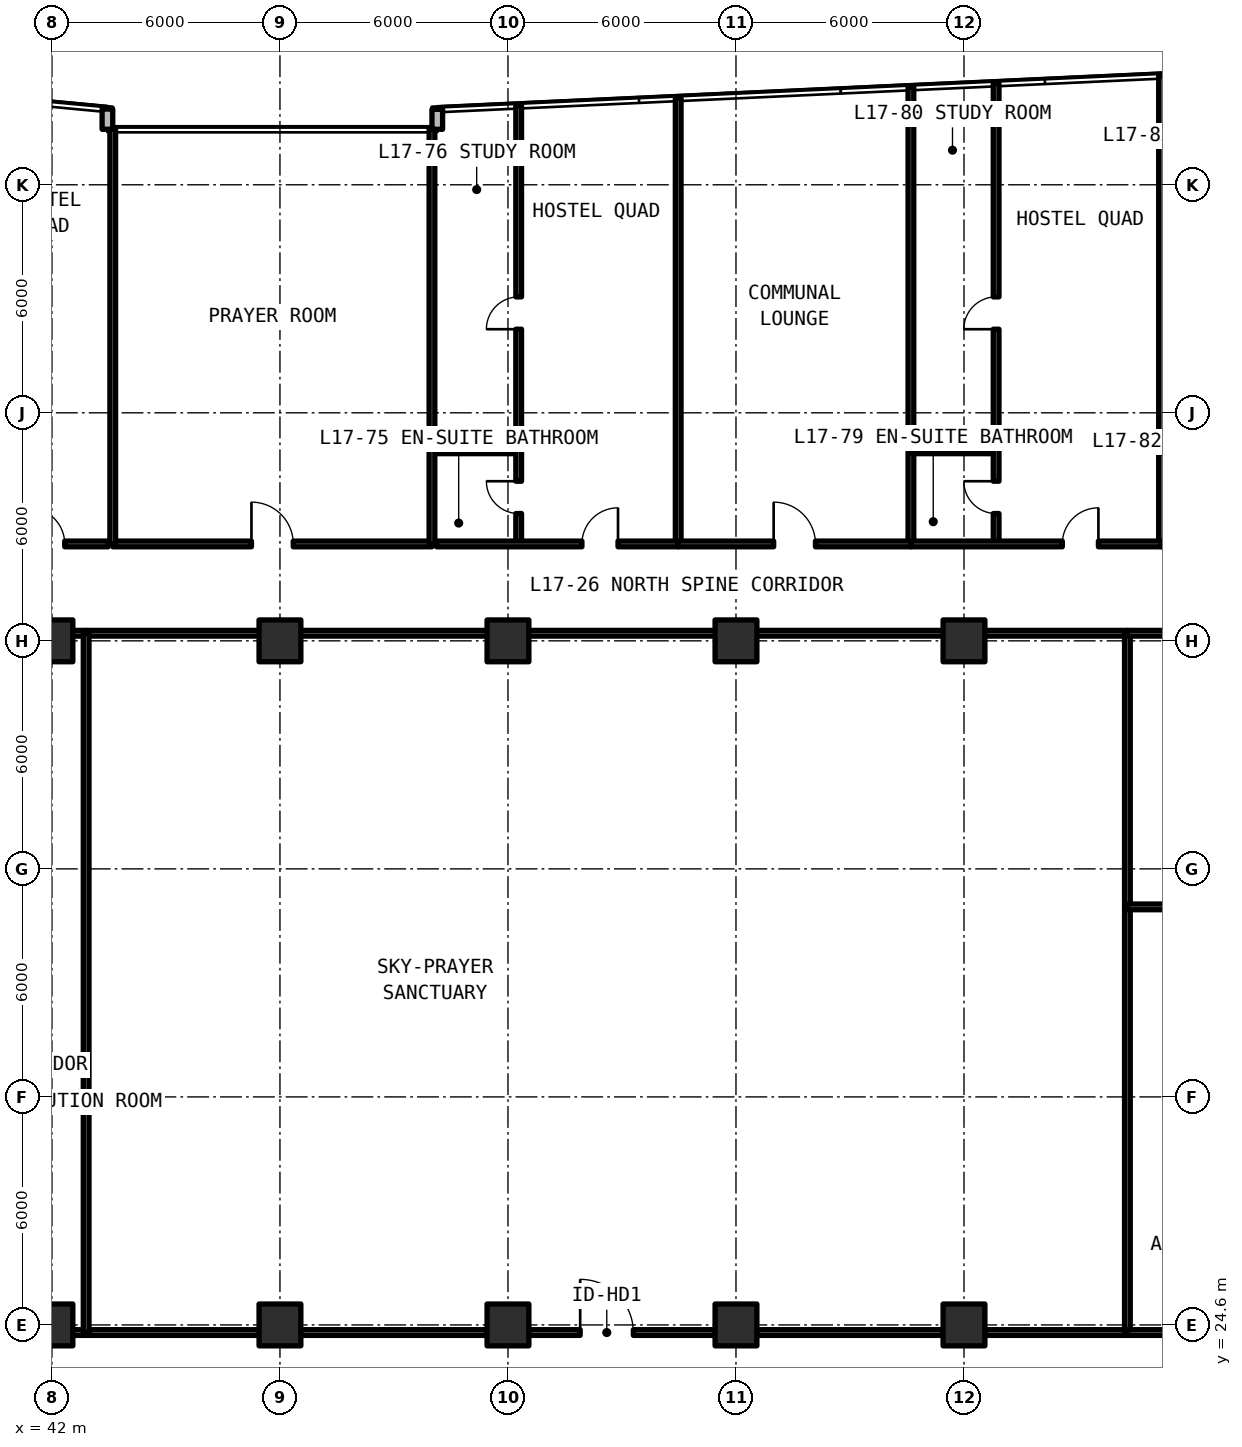
"""IFC4 building model, lengths in metres.
Left out: names, types, materials, properties, quantities, classifications, styles, units other than length and angle.
Written with IfcOpenShell. Run it as: python <this file> out.ifc"""

import sys

from ifc_helpers import new_model, si_unit, direction, frame, frame_2d, origin, origin_2d, place, context, subcontext, project, spatial, rectangle, extrude, element, fill, save


model = new_model("IFC4")
c1 = context("Model", 3, precision=1e-05, world=origin(), true_north=direction((0.0, 1.0)))
c2 = subcontext(c1, "Body", "Model", "MODEL_VIEW")
j1 = project(units=[si_unit("LENGTHUNIT", "METRE"), si_unit("PLANEANGLEUNIT", "RADIAN")], contexts=[c1])
p1 = place(None, origin())
s1 = spatial("IfcSite", under=j1, at=p1, CompositionType="ELEMENT")
p2 = place(p1, origin())
s2 = spatial("IfcBuilding", under=s1, at=p2, CompositionType="ELEMENT")
p3 = place(p2, frame((0.0, 0.0, 62.37)))
s3 = spatial("IfcBuildingStorey", under=s2, at=p3, CompositionType="ELEMENT", Elevation=62.37)
for number, where, z_axis, x_axis in (
    (1, (42.0, 24.6, 0.0), (0.0, 0.0, 1.0), (1.0, 0.0, 0.0)),
    (2, (42.0, 42.6, 0.0), (0.0, 0.0, 1.0), (1.0, 0.0, 0.0)),
    (3, (48.0, 24.6, 0.0), (0.0, 0.0, 1.0), (1.0, 0.0, 0.0)),
    (4, (48.0, 42.6, 0.0), (0.0, 0.0, 1.0), (1.0, 0.0, 0.0)),
    (5, (54.0, 24.6, 0.0), (0.0, 0.0, 1.0), (1.0, 0.0, 0.0)),
    (6, (54.0, 42.6, 0.0), (0.0, 0.0, 1.0), (1.0, 0.0, 0.0)),
    (7, (60.0, 24.6, 0.0), (0.0, 0.0, 1.0), (1.0, 0.0, 0.0)),
    (8, (60.0, 42.6, 0.0), (0.0, 0.0, 1.0), (1.0, 0.0, 0.0)),
    (9, (66.0, 24.6, 0.0), (0.0, 0.0, 1.0), (1.0, 0.0, 0.0)),
    (10, (66.0, 42.6, 0.0), (0.0, 0.0, 1.0), (1.0, 0.0, 0.0)),
):
    element("IfcColumn", number, at=place(p3, frame(where, z_axis=z_axis, x_axis=x_axis)), inside=s3, PredefinedType="COLUMN", context=c2, shape_type="SweptSolid", body=[
        extrude(rectangle(XDim=1.1, YDim=1.1, at=origin_2d()), origin(), (0.0, 0.0, 1.0), 3.63),
    ])
p4 = place(p3, frame((52.14, 56.586, 0.0), z_axis=(0.0, 0.0, 1.0), x_axis=(0.0, -1.0, 0.0)))
e11 = element("IfcWall", 11, at=p4, inside=s3, PredefinedType="SOLIDWALL", context=c2, shape_type="SweptSolid", body=[
    extrude(rectangle(XDim=0.526, YDim=0.28, at=frame_2d((0.263, 0.0))), origin(), (0.0, 0.0, 1.0), 3.41),
])
p5 = place(p3, frame((43.46, 56.06, 0.0), z_axis=(0.0, 0.0, 1.0), x_axis=(0.0, 1.0, 0.0)))
e12 = element("IfcWall", 12, at=p5, inside=s3, PredefinedType="SOLIDWALL", context=c2, shape_type="SweptSolid", body=[
    extrude(rectangle(XDim=0.532, YDim=0.28, at=frame_2d((0.266, 0.0))), origin(), (0.0, 0.0, 1.0), 3.41),
])
p6 = place(p3, frame((38.6, 24.4, 0.0), z_axis=(0.0, 0.0, 1.0), x_axis=(1.0, 0.0, 0.0)))
e13 = element("IfcWall", 13, at=p6, inside=s3, PredefinedType="SOLIDWALL", context=c2, shape_type="SweptSolid", body=[
    extrude(rectangle(XDim=4.3, YDim=0.15, at=frame_2d((2.15, 0.0))), origin(), (0.0, 0.0, 1.0), 2.625),
])
p7 = place(p3, frame((38.6, 31.4, 0.0), z_axis=(0.0, 0.0, 1.0), x_axis=(1.0, 0.0, 0.0)))
e14 = element("IfcWall", 14, at=p7, inside=s3, PredefinedType="SOLIDWALL", context=c2, shape_type="SweptSolid", body=[
    extrude(rectangle(XDim=4.3, YDim=0.15, at=frame_2d((2.15, 0.0))), origin(), (0.0, 0.0, 1.0), 2.63),
])
p8 = place(p3, frame((38.6, 42.8, 0.0), z_axis=(0.0, 0.0, 1.0), x_axis=(1.0, 0.0, 0.0)))
e15 = element("IfcWall", 15, at=p8, inside=s3, PredefinedType="SOLIDWALL", context=c2, shape_type="SweptSolid", body=[
    extrude(rectangle(XDim=4.3, YDim=0.15, at=frame_2d((2.15, 0.0))), origin(), (0.0, 0.0, 1.0), 2.625),
])
p9 = place(p3, frame((42.9, 24.4, 0.0), z_axis=(0.0, 0.0, 1.0), x_axis=(1.0, 0.0, 0.0)))
e16 = element("IfcWall", 16, at=p9, inside=s3, PredefinedType="SOLIDWALL", context=c2, shape_type="SweptSolid", body=[
    extrude(rectangle(XDim=27.4, YDim=0.15, at=frame_2d((13.7, 0.0))), origin(), (0.0, 0.0, 1.0), 2.625),
])
p10 = place(p9, frame((13.0, 0.0, 0.0)))
e17 = element("IfcOpeningElement", 17, at=p10, cuts=e16, PredefinedType="OPENING", context=c2, shape_type="SweptSolid", body=[
    extrude(rectangle(XDim=1.4, YDim=2.15, at=frame_2d((0.7, 1.075))), frame((0.0, 0.085, 0.0), z_axis=(0.0, -1.0, 0.0), x_axis=(1.0, 0.0, 0.0)), (0.0, 0.0, 1.0), 0.17),
])
p11 = place(p3, frame((42.9, 42.8, 0.0), z_axis=(0.0, 0.0, 1.0), x_axis=(1.0, 0.0, 0.0)))
e18 = element("IfcWall", 18, at=p11, inside=s3, PredefinedType="SOLIDWALL", context=c2, shape_type="SweptSolid", body=[
    extrude(rectangle(XDim=27.4, YDim=0.15, at=frame_2d((13.7, 0.0))), origin(), (0.0, 0.0, 1.0), 2.625),
])
for number, where, z_axis, x_axis in (
    (19, (42.9, 24.4, 0.0), (0.0, 0.0, 1.0), (0.0, 1.0, 0.0)),
    (20, (70.3, 24.4, 0.0), (0.0, 0.0, 1.0), (0.0, 1.0, 0.0)),
):
    element("IfcWall", number, at=place(p3, frame(where, z_axis=z_axis, x_axis=x_axis)), inside=s3, PredefinedType="SOLIDWALL", context=c2, shape_type="SweptSolid", body=[
        extrude(rectangle(XDim=18.4, YDim=0.15, at=frame_2d((9.2, 0.0))), origin(), (0.0, 0.0, 1.0), 2.63),
    ])
p12 = place(p3, frame((70.3, 24.4, 0.0), z_axis=(0.0, 0.0, 1.0), x_axis=(1.0, 0.0, 0.0)))
e21 = element("IfcWall", 21, at=p12, inside=s3, PredefinedType="SOLIDWALL", context=c2, shape_type="SweptSolid", body=[
    extrude(rectangle(XDim=5.1, YDim=0.15, at=frame_2d((2.55, 0.0))), origin(), (0.0, 0.0, 1.0), 2.625),
])
p13 = place(p3, frame((70.3, 35.6, 0.0), z_axis=(0.0, 0.0, 1.0), x_axis=(1.0, 0.0, 0.0)))
e22 = element("IfcWall", 22, at=p13, inside=s3, PredefinedType="SOLIDWALL", context=c2, shape_type="SweptSolid", body=[
    extrude(rectangle(XDim=5.1, YDim=0.15, at=frame_2d((2.55, 0.0))), origin(), (0.0, 0.0, 1.0), 2.63),
])
p14 = place(p3, frame((70.3, 42.8, 0.0), z_axis=(0.0, 0.0, 1.0), x_axis=(1.0, 0.0, 0.0)))
e23 = element("IfcWall", 23, at=p14, inside=s3, PredefinedType="SOLIDWALL", context=c2, shape_type="SweptSolid", body=[
    extrude(rectangle(XDim=5.1, YDim=0.15, at=frame_2d((2.55, 0.0))), origin(), (0.0, 0.0, 1.0), 2.625),
])
p15 = place(p3, frame((43.6, 45.15, 0.0), z_axis=(0.0, 0.0, 1.0), x_axis=(1.0, 0.0, 0.0)))
e24 = element("IfcWall", 24, at=p15, inside=s3, PredefinedType="SOLIDWALL", context=c2, shape_type="SweptSolid", body=[
    extrude(rectangle(XDim=8.4, YDim=0.15, at=frame_2d((4.2, 0.0))), origin(), (0.0, 0.0, 1.0), 2.63),
])
p16 = place(p15, frame((3.65, 0.0, 0.0)))
e25 = element("IfcOpeningElement", 25, at=p16, cuts=e24, PredefinedType="OPENING", context=c2, shape_type="SweptSolid", body=[
    extrude(rectangle(XDim=1.1, YDim=2.15, at=frame_2d((0.55, 1.075))), frame((0.0, 0.085, 0.0), z_axis=(0.0, -1.0, 0.0), x_axis=(1.0, 0.0, 0.0)), (0.0, 0.0, 1.0), 0.17),
])
for number, where, z_axis, x_axis in (
    (26, (43.6, 45.15, 0.0), (0.0, 0.0, 1.0), (0.0, 1.0, 0.0)),
    (27, (52.0, 45.15, 0.0), (0.0, 0.0, 1.0), (0.0, 1.0, 0.0)),
):
    element("IfcWall", number, at=place(p3, frame(where, z_axis=z_axis, x_axis=x_axis)), inside=s3, PredefinedType="SOLIDWALL", context=c2, shape_type="SweptSolid", body=[
        extrude(rectangle(XDim=10.91, YDim=0.15, at=frame_2d((5.455, 0.0))), origin(), (0.0, 0.0, 1.0), 2.63),
    ])
p17 = place(p3, frame((38.312, 45.15, 0.0), z_axis=(0.0, 0.0, 1.0), x_axis=(1.0, 0.0, 0.0)))
e28 = element("IfcWall", 28, at=p17, inside=s3, PredefinedType="SOLIDWALL", context=c2, shape_type="SweptSolid", body=[
    extrude(rectangle(XDim=5.168, YDim=0.15, at=frame_2d((2.584, 0.0))), origin(), (0.0, 0.0, 1.0), 2.63),
])
p18 = place(p17, frame((3.074, 0.0, 0.0)))
e29 = element("IfcOpeningElement", 29, at=p18, cuts=e28, PredefinedType="OPENING", context=c2, shape_type="SweptSolid", body=[
    extrude(rectangle(XDim=0.95, YDim=2.15, at=frame_2d((0.475, 1.075))), frame((0.0, 0.085, 0.0), z_axis=(0.0, -1.0, 0.0), x_axis=(1.0, 0.0, 0.0)), (0.0, 0.0, 1.0), 0.17),
])
p19 = place(p3, frame((58.479, 45.15, 0.0), z_axis=(0.0, 0.0, 1.0), x_axis=(0.0, 1.0, 0.0)))
e30 = element("IfcWall", 30, at=p19, inside=s3, PredefinedType="SOLIDWALL", context=c2, shape_type="SweptSolid", body=[
    extrude(rectangle(XDim=11.731, YDim=0.15, at=frame_2d((5.866, 0.0))), origin(), (0.0, 0.0, 1.0), 2.63),
])
p20 = place(p3, frame((52.12, 47.6, 0.0), z_axis=(0.0, 0.0, 1.0), x_axis=(1.0, 0.0, 0.0)))
e31 = element("IfcWall", 31, at=p20, inside=s3, PredefinedType="PARTITIONING", context=c2, shape_type="SweptSolid", body=[
    extrude(rectangle(XDim=2.162, YDim=0.15, at=frame_2d((1.081, 0.0))), origin(), (0.0, 0.0, 1.0), 2.63),
])
p21 = place(p3, frame((54.282, 45.15, 0.0), z_axis=(0.0, 0.0, 1.0), x_axis=(0.0, 1.0, 0.0)))
e32 = element("IfcWall", 32, at=p21, inside=s3, PredefinedType="PARTITIONING", context=c2, shape_type="SweptSolid", body=[
    extrude(rectangle(XDim=11.536, YDim=0.15, at=frame_2d((5.768, 0.0))), origin(), (0.0, 0.0, 1.0), 2.63),
])
p22 = place(p21, frame((0.8, 0.0, 0.0)))
e33 = element("IfcOpeningElement", 33, at=p22, cuts=e32, PredefinedType="OPENING", context=c2, shape_type="SweptSolid", body=[
    extrude(rectangle(XDim=0.85, YDim=2.1, at=frame_2d((0.425, 1.05))), frame((0.0, 0.085, 0.0), z_axis=(0.0, -1.0, 0.0), x_axis=(1.0, 0.0, 0.0)), (0.0, 0.0, 1.0), 0.17),
])
p23 = place(p21, frame((5.65, 0.0, 0.0)))
e34 = element("IfcOpeningElement", 34, at=p23, cuts=e32, PredefinedType="OPENING", context=c2, shape_type="SweptSolid", body=[
    extrude(rectangle(XDim=0.85, YDim=2.1, at=frame_2d((0.425, 1.05))), frame((0.0, 0.085, 0.0), z_axis=(0.0, -1.0, 0.0), x_axis=(1.0, 0.0, 0.0)), (0.0, 0.0, 1.0), 0.17),
])
p24 = place(p3, frame((52.12, 45.15, 0.0), z_axis=(0.0, 0.0, 1.0), x_axis=(1.0, 0.0, 0.0)))
e35 = element("IfcWall", 35, at=p24, inside=s3, PredefinedType="SOLIDWALL", context=c2, shape_type="SweptSolid", body=[
    extrude(rectangle(XDim=6.359, YDim=0.15, at=frame_2d((3.18, 0.0))), origin(), (0.0, 0.0, 1.0), 2.63),
])
p25 = place(p24, frame((3.826, 0.0, 0.0)))
e36 = element("IfcOpeningElement", 36, at=p25, cuts=e35, PredefinedType="OPENING", context=c2, shape_type="SweptSolid", body=[
    extrude(rectangle(XDim=0.95, YDim=2.15, at=frame_2d((0.475, 1.075))), frame((0.0, 0.085, 0.0), z_axis=(0.0, -1.0, 0.0), x_axis=(1.0, 0.0, 0.0)), (0.0, 0.0, 1.0), 0.17),
])
p26 = place(p3, frame((64.603, 45.15, 0.0), z_axis=(0.0, 0.0, 1.0), x_axis=(0.0, 1.0, 0.0)))
e37 = element("IfcWall", 37, at=p26, inside=s3, PredefinedType="SOLIDWALL", context=c2, shape_type="SweptSolid", body=[
    extrude(rectangle(XDim=12.016, YDim=0.15, at=frame_2d((6.008, 0.0))), origin(), (0.0, 0.0, 1.0), 2.63),
])
p27 = place(p3, frame((58.479, 45.15, 0.0), z_axis=(0.0, 0.0, 1.0), x_axis=(1.0, 0.0, 0.0)))
e38 = element("IfcWall", 38, at=p27, inside=s3, PredefinedType="SOLIDWALL", context=c2, shape_type="SweptSolid", body=[
    extrude(rectangle(XDim=6.124, YDim=0.15, at=frame_2d((3.062, 0.0))), origin(), (0.0, 0.0, 1.0), 2.63),
])
p28 = place(p27, frame((2.512, 0.0, 0.0)))
e39 = element("IfcOpeningElement", 39, at=p28, cuts=e38, PredefinedType="OPENING", context=c2, shape_type="SweptSolid", body=[
    extrude(rectangle(XDim=1.1, YDim=2.15, at=frame_2d((0.55, 1.075))), frame((0.0, 0.085, 0.0), z_axis=(0.0, -1.0, 0.0), x_axis=(1.0, 0.0, 0.0)), (0.0, 0.0, 1.0), 0.17),
])
p29 = place(p3, frame((71.198, 45.15, 0.0), z_axis=(0.0, 0.0, 1.0), x_axis=(0.0, 1.0, 0.0)))
e40 = element("IfcWall", 40, at=p29, inside=s3, PredefinedType="SOLIDWALL", context=c2, shape_type="SweptSolid", body=[
    extrude(rectangle(XDim=12.323, YDim=0.15, at=frame_2d((6.162, 0.0))), origin(), (0.0, 0.0, 1.0), 2.63),
])
p30 = place(p3, frame((64.603, 47.6, 0.0), z_axis=(0.0, 0.0, 1.0), x_axis=(1.0, 0.0, 0.0)))
e41 = element("IfcWall", 41, at=p30, inside=s3, PredefinedType="PARTITIONING", context=c2, shape_type="SweptSolid", body=[
    extrude(rectangle(XDim=2.242, YDim=0.15, at=frame_2d((1.121, 0.0))), origin(), (0.0, 0.0, 1.0), 2.63),
])
p31 = place(p3, frame((66.845, 45.15, 0.0), z_axis=(0.0, 0.0, 1.0), x_axis=(0.0, 1.0, 0.0)))
e42 = element("IfcWall", 42, at=p31, inside=s3, PredefinedType="PARTITIONING", context=c2, shape_type="SweptSolid", body=[
    extrude(rectangle(XDim=12.12, YDim=0.15, at=frame_2d((6.06, 0.0))), origin(), (0.0, 0.0, 1.0), 2.63),
])
p32 = place(p31, frame((0.8, 0.0, 0.0)))
e43 = element("IfcOpeningElement", 43, at=p32, cuts=e42, PredefinedType="OPENING", context=c2, shape_type="SweptSolid", body=[
    extrude(rectangle(XDim=0.85, YDim=2.1, at=frame_2d((0.425, 1.05))), frame((0.0, 0.085, 0.0), z_axis=(0.0, -1.0, 0.0), x_axis=(1.0, 0.0, 0.0)), (0.0, 0.0, 1.0), 0.17),
])
p33 = place(p31, frame((5.65, 0.0, 0.0)))
e44 = element("IfcOpeningElement", 44, at=p33, cuts=e42, PredefinedType="OPENING", context=c2, shape_type="SweptSolid", body=[
    extrude(rectangle(XDim=0.85, YDim=2.1, at=frame_2d((0.425, 1.05))), frame((0.0, 0.085, 0.0), z_axis=(0.0, -1.0, 0.0), x_axis=(1.0, 0.0, 0.0)), (0.0, 0.0, 1.0), 0.17),
])
p34 = place(p3, frame((64.603, 45.15, 0.0), z_axis=(0.0, 0.0, 1.0), x_axis=(1.0, 0.0, 0.0)))
e45 = element("IfcWall", 45, at=p34, inside=s3, PredefinedType="SOLIDWALL", context=c2, shape_type="SweptSolid", body=[
    extrude(rectangle(XDim=6.595, YDim=0.15, at=frame_2d((3.297, 0.0))), origin(), (0.0, 0.0, 1.0), 2.63),
])
p35 = place(p34, frame((3.984, 0.0, 0.0)))
e46 = element("IfcOpeningElement", 46, at=p35, cuts=e45, PredefinedType="OPENING", context=c2, shape_type="SweptSolid", body=[
    extrude(rectangle(XDim=0.95, YDim=2.15, at=frame_2d((0.475, 1.075))), frame((0.0, 0.085, 0.0), z_axis=(0.0, -1.0, 0.0), x_axis=(1.0, 0.0, 0.0)), (0.0, 0.0, 1.0), 0.17),
])
p36 = place(p3, frame((71.198, 47.6, 0.0), z_axis=(0.0, 0.0, 1.0), x_axis=(1.0, 0.0, 0.0)))
e47 = element("IfcWall", 47, at=p36, inside=s3, PredefinedType="PARTITIONING", context=c2, shape_type="SweptSolid", body=[
    extrude(rectangle(XDim=2.082, YDim=0.15, at=frame_2d((1.041, 0.0))), origin(), (0.0, 0.0, 1.0), 2.63),
])
p37 = place(p3, frame((71.198, 45.15, 0.0), z_axis=(0.0, 0.0, 1.0), x_axis=(1.0, 0.0, 0.0)))
e48 = element("IfcWall", 48, at=p37, inside=s3, PredefinedType="SOLIDWALL", context=c2, shape_type="SweptSolid", body=[
    extrude(rectangle(XDim=6.124, YDim=0.15, at=frame_2d((3.062, 0.0))), origin(), (0.0, 0.0, 1.0), 2.63),
])
p38 = place(p37, frame((3.668, 0.0, 0.0)))
e49 = element("IfcOpeningElement", 49, at=p38, cuts=e48, PredefinedType="OPENING", context=c2, shape_type="SweptSolid", body=[
    extrude(rectangle(XDim=0.95, YDim=2.15, at=frame_2d((0.475, 1.075))), frame((0.0, 0.085, 0.0), z_axis=(0.0, -1.0, 0.0), x_axis=(1.0, 0.0, 0.0)), (0.0, 0.0, 1.0), 0.17),
])
p39 = place(p10, origin())
e50 = element("IfcDoor", 50, at=p39, inside=s3, OperationType="SINGLE_SWING_RIGHT", PredefinedType="DOOR", context=c2, shape_type="SweptSolid", body=[
    extrude(rectangle(XDim=1.4, YDim=2.15, at=frame_2d((0.7, 1.075))), frame((0.0, 0.025, 0.0), z_axis=(0.0, -1.0, 0.0), x_axis=(1.0, 0.0, 0.0)), (0.0, 0.0, 1.0), 0.05),
])
fill(e17, e50)
p40 = place(p16, origin())
e51 = element("IfcDoor", 51, at=p40, inside=s3, OperationType="SINGLE_SWING_LEFT", PredefinedType="DOOR", context=c2, shape_type="SweptSolid", body=[
    extrude(rectangle(XDim=1.1, YDim=2.15, at=frame_2d((0.55, 1.075))), frame((0.0, 0.025, 0.0), z_axis=(0.0, -1.0, 0.0), x_axis=(1.0, 0.0, 0.0)), (0.0, 0.0, 1.0), 0.05),
])
fill(e25, e51)
p41 = place(p18, origin())
e52 = element("IfcDoor", 52, at=p41, inside=s3, OperationType="SINGLE_SWING_LEFT", PredefinedType="DOOR", context=c2, shape_type="SweptSolid", body=[
    extrude(rectangle(XDim=0.95, YDim=2.15, at=frame_2d((0.475, 1.075))), frame((0.0, 0.025, 0.0), z_axis=(0.0, -1.0, 0.0), x_axis=(1.0, 0.0, 0.0)), (0.0, 0.0, 1.0), 0.05),
])
fill(e29, e52)
p42 = place(p22, origin())
e53 = element("IfcDoor", 53, at=p42, inside=s3, OperationType="SINGLE_SWING_RIGHT", PredefinedType="DOOR", context=c2, shape_type="SweptSolid", body=[
    extrude(rectangle(XDim=0.85, YDim=2.1, at=frame_2d((0.425, 1.05))), frame((0.0, 0.025, 0.0), z_axis=(0.0, -1.0, 0.0), x_axis=(1.0, 0.0, 0.0)), (0.0, 0.0, 1.0), 0.05),
])
fill(e33, e53)
p43 = place(p23, origin())
e54 = element("IfcDoor", 54, at=p43, inside=s3, OperationType="SINGLE_SWING_LEFT", PredefinedType="DOOR", context=c2, shape_type="SweptSolid", body=[
    extrude(rectangle(XDim=0.85, YDim=2.1, at=frame_2d((0.425, 1.05))), frame((0.0, 0.025, 0.0), z_axis=(0.0, -1.0, 0.0), x_axis=(1.0, 0.0, 0.0)), (0.0, 0.0, 1.0), 0.05),
])
fill(e34, e54)
p44 = place(p25, origin())
e55 = element("IfcDoor", 55, at=p44, inside=s3, OperationType="SINGLE_SWING_RIGHT", PredefinedType="DOOR", context=c2, shape_type="SweptSolid", body=[
    extrude(rectangle(XDim=0.95, YDim=2.15, at=frame_2d((0.475, 1.075))), frame((0.0, 0.025, 0.0), z_axis=(0.0, -1.0, 0.0), x_axis=(1.0, 0.0, 0.0)), (0.0, 0.0, 1.0), 0.05),
])
fill(e36, e55)
p45 = place(p28, origin())
e56 = element("IfcDoor", 56, at=p45, inside=s3, OperationType="SINGLE_SWING_LEFT", PredefinedType="DOOR", context=c2, shape_type="SweptSolid", body=[
    extrude(rectangle(XDim=1.1, YDim=2.15, at=frame_2d((0.55, 1.075))), frame((0.0, 0.025, 0.0), z_axis=(0.0, -1.0, 0.0), x_axis=(1.0, 0.0, 0.0)), (0.0, 0.0, 1.0), 0.05),
])
fill(e39, e56)
p46 = place(p32, origin())
e57 = element("IfcDoor", 57, at=p46, inside=s3, OperationType="SINGLE_SWING_RIGHT", PredefinedType="DOOR", context=c2, shape_type="SweptSolid", body=[
    extrude(rectangle(XDim=0.85, YDim=2.1, at=frame_2d((0.425, 1.05))), frame((0.0, 0.025, 0.0), z_axis=(0.0, -1.0, 0.0), x_axis=(1.0, 0.0, 0.0)), (0.0, 0.0, 1.0), 0.05),
])
fill(e43, e57)
p47 = place(p33, origin())
e58 = element("IfcDoor", 58, at=p47, inside=s3, OperationType="SINGLE_SWING_LEFT", PredefinedType="DOOR", context=c2, shape_type="SweptSolid", body=[
    extrude(rectangle(XDim=0.85, YDim=2.1, at=frame_2d((0.425, 1.05))), frame((0.0, 0.025, 0.0), z_axis=(0.0, -1.0, 0.0), x_axis=(1.0, 0.0, 0.0)), (0.0, 0.0, 1.0), 0.05),
])
fill(e44, e58)
p48 = place(p35, origin())
e59 = element("IfcDoor", 59, at=p48, inside=s3, OperationType="SINGLE_SWING_RIGHT", PredefinedType="DOOR", context=c2, shape_type="SweptSolid", body=[
    extrude(rectangle(XDim=0.95, YDim=2.15, at=frame_2d((0.475, 1.075))), frame((0.0, 0.025, 0.0), z_axis=(0.0, -1.0, 0.0), x_axis=(1.0, 0.0, 0.0)), (0.0, 0.0, 1.0), 0.05),
])
fill(e46, e59)
save(model, sys.argv[1])
